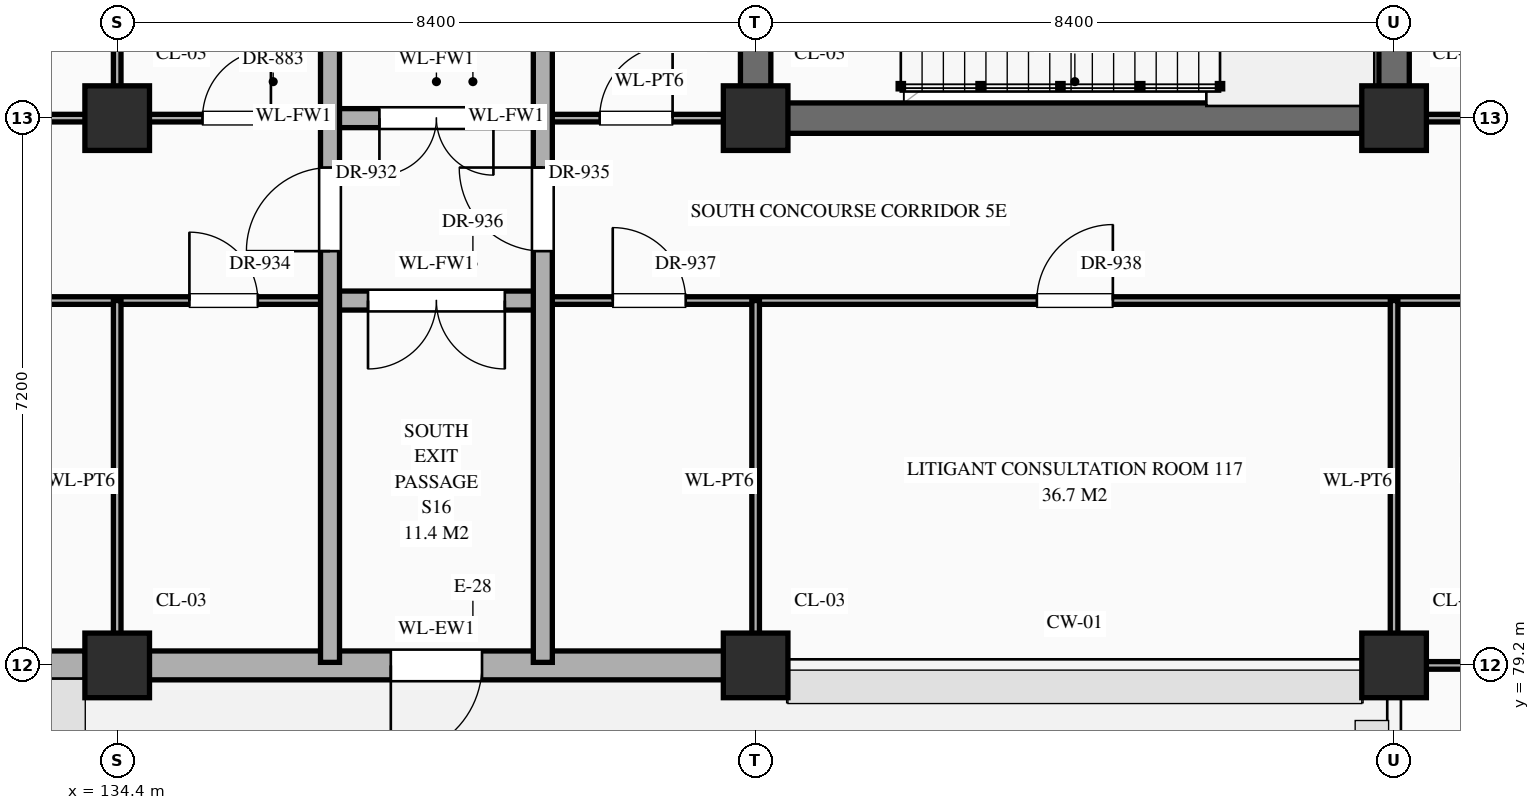
"""IFC4 building model, lengths in metres.
Left out: names, types, materials, properties, quantities, classifications, styles, units other than length and angle.
Written with IfcOpenShell. Run it as: python <this file> out.ifc"""

import sys

from ifc_helpers import new_model, si_unit, direction, frame, frame_2d, origin, origin_2d, place, context, subcontext, project, spatial, rectangle, extrude, element, fill, save


model = new_model("IFC4")
c1 = context("Model", 3, precision=1e-05, world=origin(), true_north=direction((0.0, 1.0)))
c2 = subcontext(c1, "Body", "Model", "MODEL_VIEW")
j1 = project(units=[si_unit("LENGTHUNIT", "METRE"), si_unit("PLANEANGLEUNIT", "RADIAN")], contexts=[c1])
p1 = place(None, origin())
s1 = spatial("IfcSite", under=j1, at=p1, CompositionType="ELEMENT")
p2 = place(p1, origin())
s2 = spatial("IfcBuilding", under=s1, at=p2, CompositionType="ELEMENT")
p3 = place(p2, origin())
s3 = spatial("IfcBuildingStorey", under=s2, at=p3, CompositionType="ELEMENT", Elevation=0.0)
for number, where, z_axis, x_axis in (
    (1, (134.4, 79.2, 0.0), (0.0, 0.0, 1.0), (1.0, 0.0, 0.0)),
    (2, (134.4, 86.4, 0.0), (0.0, 0.0, 1.0), (1.0, 0.0, 0.0)),
    (3, (142.8, 79.2, 0.0), (0.0, 0.0, 1.0), (1.0, 0.0, 0.0)),
    (4, (142.8, 86.4, 0.0), (0.0, 0.0, 1.0), (1.0, 0.0, 0.0)),
    (5, (151.2, 79.2, 0.0), (0.0, 0.0, 1.0), (1.0, 0.0, 0.0)),
    (6, (151.2, 86.4, 0.0), (0.0, 0.0, 1.0), (1.0, 0.0, 0.0)),
):
    element("IfcColumn", number, at=place(p3, frame(where, z_axis=z_axis, x_axis=x_axis)), inside=s3, PredefinedType="COLUMN", context=c2, shape_type="SweptSolid", body=[
        extrude(rectangle(XDim=0.85, YDim=0.85, at=origin_2d()), origin(), (0.0, 0.0, 1.0), 5.4),
    ])
p4 = place(p3, frame((126.42, 79.2, 0.0), z_axis=(0.0, 0.0, 1.0), x_axis=(1.0, 0.0, 0.0)))
e7 = element("IfcWall", 7, at=p4, inside=s3, PredefinedType="STANDARD", context=c2, shape_type="SweptSolid", body=[
    extrude(rectangle(XDim=7.56, YDim=0.38, at=frame_2d((3.78, 0.0))), origin(), (0.0, 0.0, 1.0), 4.47),
])
p5 = place(p4, frame((2.58, 0.0, 0.0)))
e8 = element("IfcOpeningElement", 8, at=p5, cuts=e7, PredefinedType="OPENING", context=c2, shape_type="SweptSolid", body=[
    extrude(rectangle(XDim=2.4, YDim=2.4, at=frame_2d((1.2, 1.2))), frame((0.0, 0.202, 0.0), z_axis=(0.0, -1.0, 0.0), x_axis=(1.0, 0.0, 0.0)), (0.0, 0.0, 1.0), 0.404),
])
p6 = place(p3, frame((134.82, 79.2, 0.0), z_axis=(0.0, 0.0, 1.0), x_axis=(1.0, 0.0, 0.0)))
e9 = element("IfcWall", 9, at=p6, inside=s3, PredefinedType="STANDARD", context=c2, shape_type="SweptSolid", body=[
    extrude(rectangle(XDim=7.56, YDim=0.38, at=frame_2d((3.78, 0.0))), origin(), (0.0, 0.0, 1.0), 4.47),
])
p7 = place(p6, frame((3.18, 0.0, 0.0)))
e10 = element("IfcOpeningElement", 10, at=p7, cuts=e9, PredefinedType="OPENING", context=c2, shape_type="SweptSolid", body=[
    extrude(rectangle(XDim=1.2, YDim=2.2, at=frame_2d((0.6, 1.1))), frame((0.0, 0.202, 0.0), z_axis=(0.0, -1.0, 0.0), x_axis=(1.0, 0.0, 0.0)), (0.0, 0.0, 1.0), 0.404),
])
p8 = place(p3, frame((151.24, 79.2, 0.0), z_axis=(0.0, 0.0, 1.0), x_axis=(1.0, 0.0, 0.0)))
e11 = element("IfcWall", 11, at=p8, inside=s3, PredefinedType="STANDARD", context=c2, shape_type="SweptSolid", body=[
    extrude(rectangle(XDim=16.72, YDim=0.1, at=frame_2d((8.36, 0.0))), origin(), (0.0, 0.0, 1.0), 4.27),
])
p9 = place(p8, frame((6.317, 0.0, 0.0)))
e12 = element("IfcOpeningElement", 12, at=p9, cuts=e11, PredefinedType="OPENING", context=c2, shape_type="SweptSolid", body=[
    extrude(rectangle(XDim=0.94, YDim=2.3, at=frame_2d((0.47, 1.15))), frame((0.0, 0.062, 0.0), z_axis=(0.0, -1.0, 0.0), x_axis=(1.0, 0.0, 0.0)), (0.0, 0.0, 1.0), 0.124),
])
p10 = place(p3, frame((114.8, 84.0, 0.0), z_axis=(0.0, 0.0, 1.0), x_axis=(1.0, 0.0, 0.0)))
e13 = element("IfcWall", 13, at=p10, inside=s3, PredefinedType="STANDARD", context=c2, shape_type="SweptSolid", body=[
    extrude(rectangle(XDim=22.4, YDim=0.1, at=frame_2d((11.2, 0.0))), origin(), (0.0, 0.0, 1.0), 5.12),
])
p11 = place(p10, frame((0.89, 0.0, 0.0)))
e14 = element("IfcOpeningElement", 14, at=p11, cuts=e13, PredefinedType="OPENING", context=c2, shape_type="SweptSolid", body=[
    extrude(rectangle(XDim=1.02, YDim=2.4, at=frame_2d((0.51, 1.2))), frame((0.0, 0.062, 0.0), z_axis=(0.0, -1.0, 0.0), x_axis=(1.0, 0.0, 0.0)), (0.0, 0.0, 1.0), 0.124),
])
p12 = place(p10, frame((10.63, 0.0, 0.0)))
e15 = element("IfcOpeningElement", 15, at=p12, cuts=e13, PredefinedType="OPENING", context=c2, shape_type="SweptSolid", body=[
    extrude(rectangle(XDim=1.14, YDim=2.4, at=frame_2d((0.57, 1.2))), frame((0.0, 0.062, 0.0), z_axis=(0.0, -1.0, 0.0), x_axis=(1.0, 0.0, 0.0)), (0.0, 0.0, 1.0), 0.124),
])
p13 = place(p10, frame((20.55, 0.0, 0.0)))
e16 = element("IfcOpeningElement", 16, at=p13, cuts=e13, PredefinedType="OPENING", context=c2, shape_type="SweptSolid", body=[
    extrude(rectangle(XDim=0.9, YDim=2.15, at=frame_2d((0.45, 1.075))), frame((0.0, 0.062, 0.0), z_axis=(0.0, -1.0, 0.0), x_axis=(1.0, 0.0, 0.0)), (0.0, 0.0, 1.0), 0.124),
])
p14 = place(p3, frame((137.2, 84.0, 0.0), z_axis=(0.0, 0.0, 1.0), x_axis=(1.0, 0.0, 0.0)))
e17 = element("IfcWall", 17, at=p14, inside=s3, PredefinedType="STANDARD", context=c2, shape_type="SweptSolid", body=[
    extrude(rectangle(XDim=2.8, YDim=0.25, at=frame_2d((1.4, 0.0))), origin(), (0.0, 0.0, 1.0), 5.12),
])
p15 = place(p14, frame((0.5, 0.0, 0.0)))
e18 = element("IfcOpeningElement", 18, at=p15, cuts=e17, PredefinedType="OPENING", context=c2, shape_type="SweptSolid", body=[
    extrude(rectangle(XDim=1.8, YDim=2.35, at=frame_2d((0.9, 1.175))), frame((0.0, 0.137, 0.0), z_axis=(0.0, -1.0, 0.0), x_axis=(1.0, 0.0, 0.0)), (0.0, 0.0, 1.0), 0.274),
])
p16 = place(p3, frame((140.0, 84.0, 0.0), z_axis=(0.0, 0.0, 1.0), x_axis=(1.0, 0.0, 0.0)))
e19 = element("IfcWall", 19, at=p16, inside=s3, PredefinedType="STANDARD", context=c2, shape_type="SweptSolid", body=[
    extrude(rectangle(XDim=27.96, YDim=0.1, at=frame_2d((13.98, 0.0))), origin(), (0.0, 0.0, 1.0), 5.12),
])
p17 = place(p16, frame((0.92, 0.0, 0.0)))
e20 = element("IfcOpeningElement", 20, at=p17, cuts=e19, PredefinedType="OPENING", context=c2, shape_type="SweptSolid", body=[
    extrude(rectangle(XDim=0.96, YDim=2.2, at=frame_2d((0.48, 1.1))), frame((0.0, 0.062, 0.0), z_axis=(0.0, -1.0, 0.0), x_axis=(1.0, 0.0, 0.0)), (0.0, 0.0, 1.0), 0.124),
])
p18 = place(p16, frame((6.5, 0.0, 0.0)))
e21 = element("IfcOpeningElement", 21, at=p18, cuts=e19, PredefinedType="OPENING", context=c2, shape_type="SweptSolid", body=[
    extrude(rectangle(XDim=1.0, YDim=2.25, at=frame_2d((0.5, 1.125))), frame((0.0, 0.062, 0.0), z_axis=(0.0, -1.0, 0.0), x_axis=(1.0, 0.0, 0.0)), (0.0, 0.0, 1.0), 0.124),
])
p19 = place(p16, frame((13.48, 0.0, 0.0)))
e22 = element("IfcOpeningElement", 22, at=p19, cuts=e19, PredefinedType="OPENING", context=c2, shape_type="SweptSolid", body=[
    extrude(rectangle(XDim=1.04, YDim=2.2, at=frame_2d((0.52, 1.1))), frame((0.0, 0.062, 0.0), z_axis=(0.0, -1.0, 0.0), x_axis=(1.0, 0.0, 0.0)), (0.0, 0.0, 1.0), 0.124),
])
p20 = place(p16, frame((17.66, 0.0, 0.0)))
e23 = element("IfcOpeningElement", 23, at=p20, cuts=e19, PredefinedType="OPENING", context=c2, shape_type="SweptSolid", body=[
    extrude(rectangle(XDim=1.08, YDim=2.25, at=frame_2d((0.54, 1.125))), frame((0.0, 0.062, 0.0), z_axis=(0.0, -1.0, 0.0), x_axis=(1.0, 0.0, 0.0)), (0.0, 0.0, 1.0), 0.124),
])
p21 = place(p16, frame((23.22, 0.0, 0.0)))
e24 = element("IfcOpeningElement", 24, at=p21, cuts=e19, PredefinedType="OPENING", context=c2, shape_type="SweptSolid", body=[
    extrude(rectangle(XDim=1.12, YDim=2.25, at=frame_2d((0.56, 1.125))), frame((0.0, 0.062, 0.0), z_axis=(0.0, -1.0, 0.0), x_axis=(1.0, 0.0, 0.0)), (0.0, 0.0, 1.0), 0.124),
])
p22 = place(p3, frame((126.0, 86.4, 0.0), z_axis=(0.0, 0.0, 1.0), x_axis=(1.0, 0.0, 0.0)))
e25 = element("IfcWall", 25, at=p22, inside=s3, PredefinedType="STANDARD", context=c2, shape_type="SweptSolid", body=[
    extrude(rectangle(XDim=11.2, YDim=0.1, at=frame_2d((5.6, 0.0))), origin(), (0.0, 0.0, 1.0), 4.27),
])
p23 = place(p22, frame((3.63, 0.0, 0.0)))
e26 = element("IfcOpeningElement", 26, at=p23, cuts=e25, PredefinedType="OPENING", context=c2, shape_type="SweptSolid", body=[
    extrude(rectangle(XDim=1.14, YDim=2.4, at=frame_2d((0.57, 1.2))), frame((0.0, 0.062, 0.0), z_axis=(0.0, -1.0, 0.0), x_axis=(1.0, 0.0, 0.0)), (0.0, 0.0, 1.0), 0.124),
])
p24 = place(p22, frame((9.522, 0.0, 0.0)))
e27 = element("IfcOpeningElement", 27, at=p24, cuts=e25, PredefinedType="OPENING", context=c2, shape_type="SweptSolid", body=[
    extrude(rectangle(XDim=0.9, YDim=2.15, at=frame_2d((0.45, 1.075))), frame((0.0, 0.062, 0.0), z_axis=(0.0, -1.0, 0.0), x_axis=(1.0, 0.0, 0.0)), (0.0, 0.0, 1.0), 0.124),
])
p25 = place(p3, frame((137.2, 86.4, 0.0), z_axis=(0.0, 0.0, 1.0), x_axis=(1.0, 0.0, 0.0)))
e28 = element("IfcWall", 28, at=p25, inside=s3, PredefinedType="STANDARD", context=c2, shape_type="SweptSolid", body=[
    extrude(rectangle(XDim=2.8, YDim=0.25, at=frame_2d((1.4, 0.0))), origin(), (0.0, 0.0, 1.0), 4.27),
])
p26 = place(p25, frame((0.65, 0.0, 0.0)))
e29 = element("IfcOpeningElement", 29, at=p26, cuts=e28, PredefinedType="OPENING", context=c2, shape_type="SweptSolid", body=[
    extrude(rectangle(XDim=1.5, YDim=2.25, at=frame_2d((0.75, 1.125))), frame((0.0, 0.137, 0.0), z_axis=(0.0, -1.0, 0.0), x_axis=(1.0, 0.0, 0.0)), (0.0, 0.0, 1.0), 0.274),
])
p27 = place(p3, frame((140.0, 86.4, 0.0), z_axis=(0.0, 0.0, 1.0), x_axis=(1.0, 0.0, 0.0)))
e30 = element("IfcWall", 30, at=p27, inside=s3, PredefinedType="STANDARD", context=c2, shape_type="SweptSolid", body=[
    extrude(rectangle(XDim=2.8, YDim=0.1, at=frame_2d((1.4, 0.0))), origin(), (0.0, 0.0, 1.0), 4.27),
])
p28 = place(p27, frame((0.748, 0.0, 0.0)))
e31 = element("IfcOpeningElement", 31, at=p28, cuts=e30, PredefinedType="OPENING", context=c2, shape_type="SweptSolid", body=[
    extrude(rectangle(XDim=0.96, YDim=2.2, at=frame_2d((0.48, 1.1))), frame((0.0, 0.062, 0.0), z_axis=(0.0, -1.0, 0.0), x_axis=(1.0, 0.0, 0.0)), (0.0, 0.0, 1.0), 0.124),
])
p29 = place(p3, frame((142.8, 86.4, 0.0), z_axis=(0.0, 0.0, 1.0), x_axis=(1.0, 0.0, 0.0)))
e32 = element("IfcWall", 32, at=p29, inside=s3, PredefinedType="SHEAR", context=c2, shape_type="SweptSolid", body=[
    extrude(rectangle(XDim=8.4, YDim=0.4, at=frame_2d((4.2, 0.0))), origin(), (0.0, 0.0, 1.0), 5.12),
])
p30 = place(p3, frame((151.2, 86.4, 0.0), z_axis=(0.0, 0.0, 1.0), x_axis=(1.0, 0.0, 0.0)))
e33 = element("IfcWall", 33, at=p30, inside=s3, PredefinedType="STANDARD", context=c2, shape_type="SweptSolid", body=[
    extrude(rectangle(XDim=16.76, YDim=0.1, at=frame_2d((8.38, 0.0))), origin(), (0.0, 0.0, 1.0), 4.27),
])
p31 = place(p30, frame((3.7, 0.0, 0.0)))
e34 = element("IfcOpeningElement", 34, at=p31, cuts=e33, PredefinedType="OPENING", context=c2, shape_type="SweptSolid", body=[
    extrude(rectangle(XDim=1.0, YDim=2.25, at=frame_2d((0.5, 1.125))), frame((0.0, 0.062, 0.0), z_axis=(0.0, -1.0, 0.0), x_axis=(1.0, 0.0, 0.0)), (0.0, 0.0, 1.0), 0.124),
])
p32 = place(p30, frame((9.433, 0.0, 0.0)))
e35 = element("IfcOpeningElement", 35, at=p32, cuts=e33, PredefinedType="OPENING", context=c2, shape_type="SweptSolid", body=[
    extrude(rectangle(XDim=1.08, YDim=2.25, at=frame_2d((0.54, 1.125))), frame((0.0, 0.062, 0.0), z_axis=(0.0, -1.0, 0.0), x_axis=(1.0, 0.0, 0.0)), (0.0, 0.0, 1.0), 0.124),
])
p33 = place(p30, frame((12.02, 0.0, 0.0)))
e36 = element("IfcOpeningElement", 36, at=p33, cuts=e33, PredefinedType="OPENING", context=c2, shape_type="SweptSolid", body=[
    extrude(rectangle(XDim=1.16, YDim=2.3, at=frame_2d((0.58, 1.15))), frame((0.0, 0.062, 0.0), z_axis=(0.0, -1.0, 0.0), x_axis=(1.0, 0.0, 0.0)), (0.0, 0.0, 1.0), 0.124),
])
p34 = place(p30, frame((14.627, 0.0, 0.0)))
e37 = element("IfcOpeningElement", 37, at=p34, cuts=e33, PredefinedType="OPENING", context=c2, shape_type="SweptSolid", body=[
    extrude(rectangle(XDim=1.2, YDim=2.35, at=frame_2d((0.6, 1.175))), frame((0.0, 0.062, 0.0), z_axis=(0.0, -1.0, 0.0), x_axis=(1.0, 0.0, 0.0)), (0.0, 0.0, 1.0), 0.124),
])
p35 = place(p3, frame((134.4, 79.24, 0.0), z_axis=(0.0, 0.0, 1.0), x_axis=(0.0, 1.0, 0.0)))
e38 = element("IfcWall", 38, at=p35, inside=s3, PredefinedType="STANDARD", context=c2, shape_type="SweptSolid", body=[
    extrude(rectangle(XDim=4.76, YDim=0.1, at=frame_2d((2.38, 0.0))), origin(), (0.0, 0.0, 1.0), 4.37),
])
p36 = place(p3, frame((134.4, 86.4, 0.0), z_axis=(0.0, 0.0, 1.0), x_axis=(0.0, 1.0, 0.0)))
e39 = element("IfcWall", 39, at=p36, inside=s3, PredefinedType="STANDARD", context=c2, shape_type="SweptSolid", body=[
    extrude(rectangle(XDim=7.2, YDim=0.1, at=frame_2d((3.6, 0.0))), origin(), (0.0, 0.0, 1.0), 4.37),
])
p37 = place(p3, frame((137.2, 79.24, 0.0), z_axis=(0.0, 0.0, 1.0), x_axis=(0.0, 1.0, 0.0)))
e40 = element("IfcWall", 40, at=p37, inside=s3, PredefinedType="STANDARD", context=c2, shape_type="SweptSolid", body=[
    extrude(rectangle(XDim=14.36, YDim=0.25, at=frame_2d((7.18, 0.0))), origin(), (0.0, 0.0, 1.0), 5.12),
])
p38 = place(p37, frame((5.41, 0.0, 0.0)))
e41 = element("IfcOpeningElement", 41, at=p38, cuts=e40, PredefinedType="OPENING", context=c2, shape_type="SweptSolid", body=[
    extrude(rectangle(XDim=1.1, YDim=2.2, at=frame_2d((0.55, 1.1))), frame((0.0, 0.137, 0.0), z_axis=(0.0, -1.0, 0.0), x_axis=(1.0, 0.0, 0.0)), (0.0, 0.0, 1.0), 0.274),
])
p39 = place(p3, frame((140.0, 79.24, 0.0), z_axis=(0.0, 0.0, 1.0), x_axis=(0.0, 1.0, 0.0)))
e42 = element("IfcWall", 42, at=p39, inside=s3, PredefinedType="STANDARD", context=c2, shape_type="SweptSolid", body=[
    extrude(rectangle(XDim=14.36, YDim=0.25, at=frame_2d((7.18, 0.0))), origin(), (0.0, 0.0, 1.0), 5.12),
])
p40 = place(p39, frame((12.61, 0.0, 0.0)))
e43 = element("IfcOpeningElement", 43, at=p40, cuts=e42, PredefinedType="OPENING", context=c2, shape_type="SweptSolid", body=[
    extrude(rectangle(XDim=1.1, YDim=2.2, at=frame_2d((0.55, 1.1))), frame((0.0, 0.137, 0.0), z_axis=(0.0, -1.0, 0.0), x_axis=(1.0, 0.0, 0.0)), (0.0, 0.0, 1.0), 0.274),
])
p41 = place(p39, frame((5.41, 0.0, 0.0)))
e44 = element("IfcOpeningElement", 44, at=p41, cuts=e42, PredefinedType="OPENING", context=c2, shape_type="SweptSolid", body=[
    extrude(rectangle(XDim=1.1, YDim=2.2, at=frame_2d((0.55, 1.1))), frame((0.0, 0.137, 0.0), z_axis=(0.0, -1.0, 0.0), x_axis=(1.0, 0.0, 0.0)), (0.0, 0.0, 1.0), 0.274),
])
p42 = place(p3, frame((142.8, 79.24, 0.0), z_axis=(0.0, 0.0, 1.0), x_axis=(0.0, 1.0, 0.0)))
e45 = element("IfcWall", 45, at=p42, inside=s3, PredefinedType="STANDARD", context=c2, shape_type="SweptSolid", body=[
    extrude(rectangle(XDim=4.76, YDim=0.1, at=frame_2d((2.38, 0.0))), origin(), (0.0, 0.0, 1.0), 4.37),
])
p43 = place(p3, frame((142.8, 86.4, 0.0), z_axis=(0.0, 0.0, 1.0), x_axis=(0.0, 1.0, 0.0)))
e46 = element("IfcWall", 46, at=p43, inside=s3, PredefinedType="SHEAR", context=c2, shape_type="SweptSolid", body=[
    extrude(rectangle(XDim=4.8, YDim=0.4, at=frame_2d((2.4, 0.0))), origin(), (0.0, 0.0, 1.0), 5.12),
])
p44 = place(p3, frame((151.2, 79.24, 0.0), z_axis=(0.0, 0.0, 1.0), x_axis=(0.0, 1.0, 0.0)))
e47 = element("IfcWall", 47, at=p44, inside=s3, PredefinedType="STANDARD", context=c2, shape_type="SweptSolid", body=[
    extrude(rectangle(XDim=4.76, YDim=0.1, at=frame_2d((2.38, 0.0))), origin(), (0.0, 0.0, 1.0), 4.37),
])
p45 = place(p3, frame((151.2, 86.4, 0.0), z_axis=(0.0, 0.0, 1.0), x_axis=(0.0, 1.0, 0.0)))
e48 = element("IfcWall", 48, at=p45, inside=s3, PredefinedType="SHEAR", context=c2, shape_type="SweptSolid", body=[
    extrude(rectangle(XDim=4.8, YDim=0.4, at=frame_2d((2.4, 0.0))), origin(), (0.0, 0.0, 1.0), 5.12),
])
p46 = place(p7, frame((1.2, 0.0, 0.0), z_axis=(0.0, 0.0, 1.0), x_axis=(-1.0, 0.0, 0.0)))
e49 = element("IfcDoor", 49, at=p46, inside=s3, OperationType="SINGLE_SWING_RIGHT", PredefinedType="DOOR", context=c2, shape_type="SweptSolid", body=[
    extrude(rectangle(XDim=1.2, YDim=2.2, at=frame_2d((0.6, 1.1))), frame((0.0, 0.025, 0.0), z_axis=(0.0, -1.0, 0.0), x_axis=(1.0, 0.0, 0.0)), (0.0, 0.0, 1.0), 0.05),
])
fill(e10, e49)
p47 = place(p24, origin())
e50 = element("IfcDoor", 50, at=p47, inside=s3, OperationType="SINGLE_SWING_RIGHT", PredefinedType="DOOR", context=c2, shape_type="SweptSolid", body=[
    extrude(rectangle(XDim=0.9, YDim=2.15, at=frame_2d((0.45, 1.075))), frame((0.0, 0.025, 0.0), z_axis=(0.0, -1.0, 0.0), x_axis=(1.0, 0.0, 0.0)), (0.0, 0.0, 1.0), 0.05),
])
fill(e27, e50)
p48 = place(p26, frame((1.5, 0.0, 0.0), z_axis=(0.0, 0.0, 1.0), x_axis=(-1.0, 0.0, 0.0)))
e51 = element("IfcDoor", 51, at=p48, inside=s3, OperationType="DOUBLE_DOOR_SINGLE_SWING", PredefinedType="DOOR", context=c2, shape_type="SweptSolid", body=[
    extrude(rectangle(XDim=1.5, YDim=2.25, at=frame_2d((0.75, 1.125))), frame((0.0, 0.025, 0.0), z_axis=(0.0, -1.0, 0.0), x_axis=(1.0, 0.0, 0.0)), (0.0, 0.0, 1.0), 0.05),
])
fill(e29, e51)
p49 = place(p28, origin())
e52 = element("IfcDoor", 52, at=p49, inside=s3, OperationType="SINGLE_SWING_RIGHT", PredefinedType="DOOR", context=c2, shape_type="SweptSolid", body=[
    extrude(rectangle(XDim=0.96, YDim=2.2, at=frame_2d((0.48, 1.1))), frame((0.0, 0.025, 0.0), z_axis=(0.0, -1.0, 0.0), x_axis=(1.0, 0.0, 0.0)), (0.0, 0.0, 1.0), 0.05),
])
fill(e31, e52)
p50 = place(p38, origin())
e53 = element("IfcDoor", 53, at=p50, inside=s3, OperationType="SINGLE_SWING_LEFT", PredefinedType="DOOR", context=c2, shape_type="SweptSolid", body=[
    extrude(rectangle(XDim=1.1, YDim=2.2, at=frame_2d((0.55, 1.1))), frame((0.0, 0.025, 0.0), z_axis=(0.0, -1.0, 0.0), x_axis=(1.0, 0.0, 0.0)), (0.0, 0.0, 1.0), 0.05),
])
fill(e41, e53)
p51 = place(p13, origin())
e54 = element("IfcDoor", 54, at=p51, inside=s3, OperationType="SINGLE_SWING_LEFT", PredefinedType="DOOR", context=c2, shape_type="SweptSolid", body=[
    extrude(rectangle(XDim=0.9, YDim=2.15, at=frame_2d((0.45, 1.075))), frame((0.0, 0.025, 0.0), z_axis=(0.0, -1.0, 0.0), x_axis=(1.0, 0.0, 0.0)), (0.0, 0.0, 1.0), 0.05),
])
fill(e16, e54)
p52 = place(p41, origin())
e55 = element("IfcDoor", 55, at=p52, inside=s3, OperationType="SINGLE_SWING_RIGHT", PredefinedType="DOOR", context=c2, shape_type="SweptSolid", body=[
    extrude(rectangle(XDim=1.1, YDim=2.2, at=frame_2d((0.55, 1.1))), frame((0.0, 0.025, 0.0), z_axis=(0.0, -1.0, 0.0), x_axis=(1.0, 0.0, 0.0)), (0.0, 0.0, 1.0), 0.05),
])
fill(e44, e55)
p53 = place(p15, frame((1.8, 0.0, 0.0), z_axis=(0.0, 0.0, 1.0), x_axis=(-1.0, 0.0, 0.0)))
e56 = element("IfcDoor", 56, at=p53, inside=s3, OperationType="DOUBLE_DOOR_SINGLE_SWING", PredefinedType="DOOR", context=c2, shape_type="SweptSolid", body=[
    extrude(rectangle(XDim=1.8, YDim=2.35, at=frame_2d((0.9, 1.175))), frame((0.0, 0.025, 0.0), z_axis=(0.0, -1.0, 0.0), x_axis=(1.0, 0.0, 0.0)), (0.0, 0.0, 1.0), 0.05),
])
fill(e18, e56)
p54 = place(p17, origin())
e57 = element("IfcDoor", 57, at=p54, inside=s3, OperationType="SINGLE_SWING_LEFT", PredefinedType="DOOR", context=c2, shape_type="SweptSolid", body=[
    extrude(rectangle(XDim=0.96, YDim=2.2, at=frame_2d((0.48, 1.1))), frame((0.0, 0.025, 0.0), z_axis=(0.0, -1.0, 0.0), x_axis=(1.0, 0.0, 0.0)), (0.0, 0.0, 1.0), 0.05),
])
fill(e20, e57)
p55 = place(p18, origin())
e58 = element("IfcDoor", 58, at=p55, inside=s3, OperationType="SINGLE_SWING_RIGHT", PredefinedType="DOOR", context=c2, shape_type="SweptSolid", body=[
    extrude(rectangle(XDim=1.0, YDim=2.25, at=frame_2d((0.5, 1.125))), frame((0.0, 0.025, 0.0), z_axis=(0.0, -1.0, 0.0), x_axis=(1.0, 0.0, 0.0)), (0.0, 0.0, 1.0), 0.05),
])
fill(e21, e58)
save(model, sys.argv[1])
